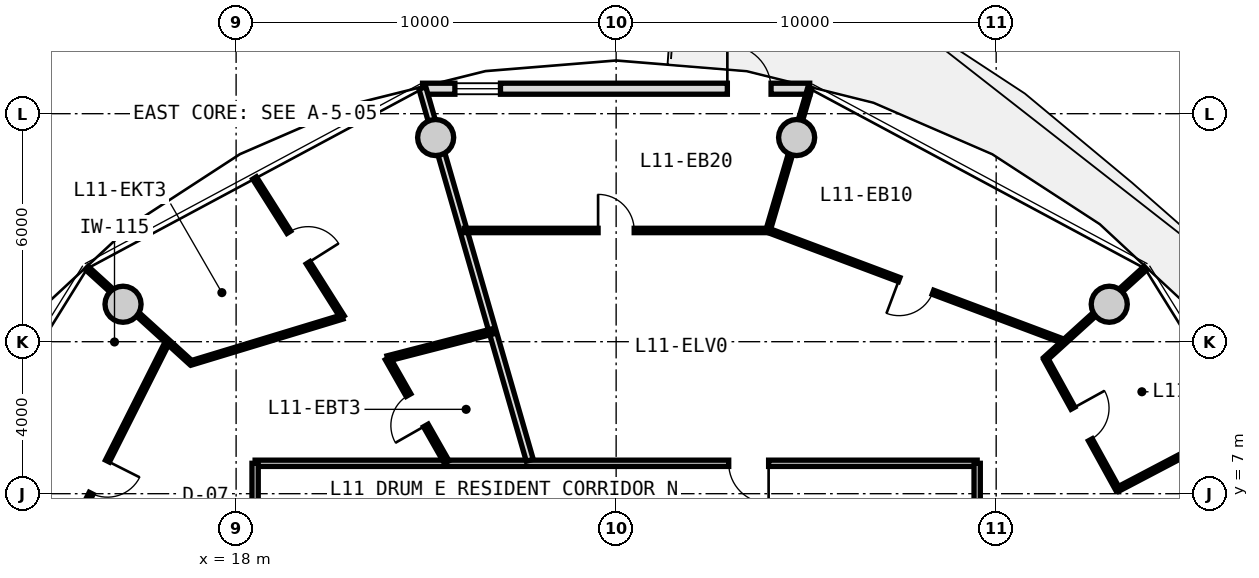
"""IFC4 building model, lengths in metres.
Left out: names, types, materials, properties, quantities, classifications, styles, units other than length and angle.
Written with IfcOpenShell. Run it as: python <this file> out.ifc"""

import sys

from ifc_helpers import new_model, si_unit, direction, frame, frame_2d, origin, origin_2d, place, context, subcontext, project, spatial, rectangle, circle, extrude, source, transform, mapped, element, fill, save


model = new_model("IFC4")
c1 = context("Model", 3, precision=1e-05, world=origin(), true_north=direction((0.0, 1.0)))
c2 = subcontext(c1, "Body", "Model", "MODEL_VIEW")
j1 = project(units=[si_unit("LENGTHUNIT", "METRE"), si_unit("PLANEANGLEUNIT", "RADIAN")], contexts=[c1])
p1 = place(None, origin())
s1 = spatial("IfcSite", under=j1, at=p1, CompositionType="ELEMENT")
p2 = place(p1, origin())
s2 = spatial("IfcBuilding", under=s1, at=p2, CompositionType="ELEMENT")
p3 = place(p2, frame((0.0, 0.0, 39.9)))
s3 = spatial("IfcBuildingStorey", under=s2, at=p3, CompositionType="ELEMENT", Elevation=39.9)
m1 = source(origin(), c2, "Body", "SweptSolid", [
    extrude(circle(Radius=0.475, at=origin_2d()), origin(), (0.0, 0.0, 1.0), 3.05),
])
for number, where, z_axis, x_axis in (
    (1, (40.975, 11.985, 0.0), (0.0, 0.0, 1.0), (1.0, 0.0, 0.0)),
    (2, (32.749, 16.373, 0.0), (0.0, 0.0, 1.0), (1.0, 0.0, 0.0)),
    (3, (23.251, 16.373, 0.0), (0.0, 0.0, 1.0), (1.0, 0.0, 0.0)),
    (4, (15.025, 11.985, 0.0), (0.0, 0.0, 1.0), (1.0, 0.0, 0.0)),
):
    element("IfcColumn", number, at=place(p3, frame(where, z_axis=z_axis, x_axis=x_axis)), inside=s3, PredefinedType="COLUMN", context=c2, shape_type="MappedRepresentation", body=[
        mapped(m1, transform((0.0, 0.0, 0.0), x_axis=(1.0, 0.0, 0.0), y_axis=(0.0, 1.0, 0.0), z_axis=(0.0, 0.0, 1.0), scale=1.0)),
    ])
m2 = source(origin(), c2, "Body", "SweptSolid", [
    extrude(rectangle(XDim=10.187, YDim=0.29, at=frame_2d((5.094, 0.0))), origin(), (0.0, 0.0, 1.0), 2.79),
])
p4 = place(p3, frame((22.906, 17.657, 0.0), z_axis=(0.0, 0.0, 1.0), x_axis=(1.0, 0.0, 0.0)))
e5 = element("IfcWall", 5, at=p4, inside=s3, PredefinedType="SOLIDWALL", context=c2, shape_type="MappedRepresentation", body=[
    mapped(m2, transform((0.0, 0.0, 0.0), x_axis=(1.0, 0.0, 0.0), y_axis=(0.0, 1.0, 0.0), z_axis=(0.0, 0.0, 1.0), scale=1.0)),
])
p5 = place(p4, frame((8.02, 0.0, 0.0)))
e6 = element("IfcOpeningElement", 6, at=p5, cuts=e5, PredefinedType="OPENING", context=c2, shape_type="SweptSolid", body=[
    extrude(rectangle(XDim=1.15, YDim=2.25, at=frame_2d((0.575, 1.125))), frame((0.0, 0.155, 0.0), z_axis=(0.0, -1.0, 0.0), x_axis=(1.0, 0.0, 0.0)), (0.0, 0.0, 1.0), 0.31),
])
p6 = place(p4, frame((0.85, 0.0, 0.85)))
e7 = element("IfcOpeningElement", 7, at=p6, cuts=e5, PredefinedType="OPENING", context=c2, shape_type="SweptSolid", body=[
    extrude(rectangle(XDim=1.2, YDim=1.5, at=frame_2d((0.6, 0.75))), frame((0.0, 0.155, 0.0), z_axis=(0.0, -1.0, 0.0), x_axis=(1.0, 0.0, 0.0)), (0.0, 0.0, 1.0), 0.31),
])
m3 = source(origin(), c2, "Body", "SweptSolid", [
    extrude(rectangle(XDim=19.0, YDim=0.165, at=frame_2d((9.5, 0.0))), origin(), (0.0, 0.0, 1.0), 2.775),
])
p7 = place(p3, frame((18.5, 7.8, 0.0), z_axis=(0.0, 0.0, 1.0), x_axis=(1.0, 0.0, 0.0)))
e8 = element("IfcWall", 8, at=p7, inside=s3, PredefinedType="PARTITIONING", context=c2, shape_type="MappedRepresentation", body=[
    mapped(m3, transform((0.0, 0.0, 0.0), x_axis=(1.0, 0.0, 0.0), y_axis=(0.0, 1.0, 0.0), z_axis=(0.0, 0.0, 1.0), scale=1.0)),
])
p8 = place(p7, frame((12.462, 0.0, 0.0)))
e9 = element("IfcOpeningElement", 9, at=p8, cuts=e8, PredefinedType="OPENING", context=c2, shape_type="SweptSolid", body=[
    extrude(rectangle(XDim=1.05, YDim=2.15, at=frame_2d((0.525, 1.075))), frame((0.0, 0.093, 0.0), z_axis=(0.0, -1.0, 0.0), x_axis=(1.0, 0.0, 0.0)), (0.0, 0.0, 1.0), 0.185),
])
m4 = source(origin(), c2, "Body", "SweptSolid", [
    extrude(rectangle(XDim=15.6, YDim=0.165, at=frame_2d((7.8, 0.0))), origin(), (0.0, 0.0, 1.0), 2.775),
])
p9 = place(p3, frame((18.5, -7.8, 0.0), z_axis=(0.0, 0.0, 1.0), x_axis=(0.0, 1.0, 0.0)))
e10 = element("IfcWall", 10, at=p9, inside=s3, PredefinedType="PARTITIONING", context=c2, shape_type="MappedRepresentation", body=[
    mapped(m4, transform((0.0, 0.0, 0.0), x_axis=(1.0, 0.0, 0.0), y_axis=(0.0, 1.0, 0.0), z_axis=(0.0, 0.0, 1.0), scale=1.0)),
])
p10 = place(p9, frame((7.275, 0.0, 0.0)))
e11 = element("IfcOpeningElement", 11, at=p10, cuts=e10, PredefinedType="OPENING", context=c2, shape_type="SweptSolid", body=[
    extrude(rectangle(XDim=1.05, YDim=2.15, at=frame_2d((0.525, 1.075))), frame((0.0, 0.093, 0.0), z_axis=(0.0, -1.0, 0.0), x_axis=(1.0, 0.0, 0.0)), (0.0, 0.0, 1.0), 0.185),
])
p11 = place(p3, frame((37.5, 7.8, 0.0), z_axis=(0.0, 0.0, 1.0), x_axis=(0.0, -1.0, 0.0)))
e12 = element("IfcWall", 12, at=p11, inside=s3, PredefinedType="PARTITIONING", context=c2, shape_type="MappedRepresentation", body=[
    mapped(m4, transform((0.0, 0.0, 0.0), x_axis=(1.0, 0.0, 0.0), y_axis=(0.0, 1.0, 0.0), z_axis=(0.0, 0.0, 1.0), scale=1.0)),
])
p12 = place(p11, frame((14.215, 0.0, 0.0)))
e13 = element("IfcOpeningElement", 13, at=p12, cuts=e12, PredefinedType="OPENING", context=c2, shape_type="SweptSolid", body=[
    extrude(rectangle(XDim=0.92, YDim=2.1, at=frame_2d((0.46, 1.05))), frame((0.0, 0.093, 0.0), z_axis=(0.0, -1.0, 0.0), x_axis=(1.0, 0.0, 0.0)), (0.0, 0.0, 1.0), 0.185),
])
p13 = place(p11, frame((11.609, 0.0, 0.0)))
e14 = element("IfcOpeningElement", 14, at=p13, cuts=e12, PredefinedType="OPENING", context=c2, shape_type="SweptSolid", body=[
    extrude(rectangle(XDim=0.92, YDim=2.1, at=frame_2d((0.46, 1.05))), frame((0.0, 0.093, 0.0), z_axis=(0.0, -1.0, 0.0), x_axis=(1.0, 0.0, 0.0)), (0.0, 0.0, 1.0), 0.185),
])
p14 = place(p11, frame((7.175, 0.0, 0.0)))
e15 = element("IfcOpeningElement", 15, at=p14, cuts=e12, PredefinedType="OPENING", context=c2, shape_type="SweptSolid", body=[
    extrude(rectangle(XDim=1.25, YDim=2.2, at=frame_2d((0.625, 1.1))), frame((0.0, 0.093, 0.0), z_axis=(0.0, -1.0, 0.0), x_axis=(1.0, 0.0, 0.0)), (0.0, 0.0, 1.0), 0.185),
])
m5 = source(origin(), c2, "Body", "SweptSolid", [
    extrude(rectangle(XDim=10.196, YDim=0.19, at=frame_2d((5.098, 0.0))), origin(), (0.0, 0.0, 1.0), 2.225),
])
p15 = place(p3, frame((25.727, 7.88, 0.0), z_axis=(0.0, 0.0, 1.0), x_axis=(-0.277136420347, 0.960830580549, 0.0)))
e16 = element("IfcWall", 16, at=p15, inside=s3, PredefinedType="PARTITIONING", context=c2, shape_type="MappedRepresentation", body=[
    mapped(m5, transform((0.0, 0.0, 0.0), x_axis=(1.0, 0.0, 0.0), y_axis=(0.0, 1.0, 0.0), z_axis=(0.0, 0.0, 1.0), scale=1.0)),
])
m6 = source(origin(), c2, "Body", "SweptSolid", [
    extrude(rectangle(XDim=8.018, YDim=0.115, at=frame_2d((4.009, 0.0))), origin(), (0.0, 0.0, 1.0), 2.775),
])
p16 = place(p3, frame((16.205, 11.014, 0.0), z_axis=(0.0, 0.0, 1.0), x_axis=(-0.450134355233, -0.89296084026, 0.0)))
e17 = element("IfcWall", 17, at=p16, inside=s3, PredefinedType="PARTITIONING", context=c2, shape_type="MappedRepresentation", body=[
    mapped(m6, transform((0.0, 0.0, 0.0), x_axis=(1.0, 0.0, 0.0), y_axis=(0.0, 1.0, 0.0), z_axis=(0.0, 0.0, 1.0), scale=1.0)),
])
p17 = place(p16, frame((3.534, 0.0, 0.0)))
e18 = element("IfcOpeningElement", 18, at=p17, cuts=e17, PredefinedType="OPENING", context=c2, shape_type="SweptSolid", body=[
    extrude(rectangle(XDim=0.95, YDim=2.1, at=frame_2d((0.475, 1.05))), frame((0.0, 0.067, 0.0), z_axis=(0.0, -1.0, 0.0), x_axis=(1.0, 0.0, 0.0)), (0.0, 0.0, 1.0), 0.135),
])
m7 = source(origin(), c2, "Body", "SweptSolid", [
    extrude(rectangle(XDim=3.7, YDim=0.115, at=frame_2d((1.85, 0.0))), origin(), (0.0, 0.0, 1.0), 2.225),
])
p18 = place(p3, frame((16.808, 10.451, 0.0), z_axis=(0.0, 0.0, 1.0), x_axis=(-0.739922161065, 0.672692497033, 0.0)))
e19 = element("IfcWall", 19, at=p18, inside=s3, PredefinedType="PARTITIONING", context=c2, shape_type="MappedRepresentation", body=[
    mapped(m7, transform((0.0, 0.0, 0.0), x_axis=(1.0, 0.0, 0.0), y_axis=(0.0, 1.0, 0.0), z_axis=(0.0, 0.0, 1.0), scale=1.0)),
])
m8 = source(origin(), c2, "Body", "SweptSolid", [
    extrude(rectangle(XDim=3.141, YDim=0.14, at=frame_2d((1.571, 0.0))), origin(), (0.0, 0.0, 1.0), 2.775),
])
p19 = place(p3, frame((23.542, 7.83, 0.0), z_axis=(0.0, 0.0, 1.0), x_axis=(-0.494874486088, 0.868964465913, 0.0)))
e20 = element("IfcWall", 20, at=p19, inside=s3, PredefinedType="PARTITIONING", context=c2, shape_type="MappedRepresentation", body=[
    mapped(m8, transform((0.0, 0.0, 0.0), x_axis=(1.0, 0.0, 0.0), y_axis=(0.0, 1.0, 0.0), z_axis=(0.0, 0.0, 1.0), scale=1.0)),
])
p20 = place(p19, frame((1.111, 0.0, 0.0)))
e21 = element("IfcOpeningElement", 21, at=p20, cuts=e20, PredefinedType="OPENING", context=c2, shape_type="SweptSolid", body=[
    extrude(rectangle(XDim=0.92, YDim=2.1, at=frame_2d((0.46, 1.05))), frame((0.0, 0.08, 0.0), z_axis=(0.0, -1.0, 0.0), x_axis=(1.0, 0.0, 0.0)), (0.0, 0.0, 1.0), 0.16),
])
m9 = source(origin(), c2, "Body", "SweptSolid", [
    extrude(rectangle(XDim=2.868, YDim=0.14, at=frame_2d((1.434, 0.0))), origin(), (0.0, 0.0, 1.0), 2.775),
])
p21 = place(p3, frame((21.987, 10.56, 0.0), z_axis=(0.0, 0.0, 1.0), x_axis=(0.968467705195, 0.249139125778, 0.0)))
e22 = element("IfcWall", 22, at=p21, inside=s3, PredefinedType="PARTITIONING", context=c2, shape_type="MappedRepresentation", body=[
    mapped(m9, transform((0.0, 0.0, 0.0), x_axis=(1.0, 0.0, 0.0), y_axis=(0.0, 1.0, 0.0), z_axis=(0.0, 0.0, 1.0), scale=1.0)),
])
m10 = source(origin(), c2, "Body", "SweptSolid", [
    extrude(rectangle(XDim=4.326, YDim=0.115, at=frame_2d((2.163, 0.0))), origin(), (0.0, 0.0, 1.0), 2.775),
])
p22 = place(p3, frame((20.796, 11.651, 0.0), z_axis=(0.0, 0.0, 1.0), x_axis=(-0.534101263803, 0.845420510755, 0.0)))
e23 = element("IfcWall", 23, at=p22, inside=s3, PredefinedType="PARTITIONING", context=c2, shape_type="MappedRepresentation", body=[
    mapped(m10, transform((0.0, 0.0, 0.0), x_axis=(1.0, 0.0, 0.0), y_axis=(0.0, 1.0, 0.0), z_axis=(0.0, 0.0, 1.0), scale=1.0)),
])
p23 = place(p22, frame((1.688, 0.0, 0.0)))
e24 = element("IfcOpeningElement", 24, at=p23, cuts=e23, PredefinedType="OPENING", context=c2, shape_type="SweptSolid", body=[
    extrude(rectangle(XDim=0.95, YDim=2.1, at=frame_2d((0.475, 1.05))), frame((0.0, 0.067, 0.0), z_axis=(0.0, -1.0, 0.0), x_axis=(1.0, 0.0, 0.0)), (0.0, 0.0, 1.0), 0.135),
])
m11 = source(origin(), c2, "Body", "SweptSolid", [
    extrude(rectangle(XDim=4.159, YDim=0.115, at=frame_2d((2.079, 0.0))), origin(), (0.0, 0.0, 1.0), 2.415),
])
p24 = place(p3, frame((20.796, 11.651, 0.0), z_axis=(0.0, 0.0, 1.0), x_axis=(-0.956846477815, -0.290593905466, 0.0)))
e25 = element("IfcWall", 25, at=p24, inside=s3, PredefinedType="PARTITIONING", context=c2, shape_type="MappedRepresentation", body=[
    mapped(m11, transform((0.0, 0.0, 0.0), x_axis=(1.0, 0.0, 0.0), y_axis=(0.0, 1.0, 0.0), z_axis=(0.0, 0.0, 1.0), scale=1.0)),
])
m12 = source(origin(), c2, "Body", "SweptSolid", [
    extrude(rectangle(XDim=8.32, YDim=0.115, at=frame_2d((4.16, 0.0))), origin(), (0.0, 0.0, 1.0), 2.775),
])
p25 = place(p3, frame((39.786, 11.006, 0.0), z_axis=(0.0, 0.0, 1.0), x_axis=(-0.936180763098, 0.351518959382, 0.0)))
e26 = element("IfcWall", 26, at=p25, inside=s3, PredefinedType="PARTITIONING", context=c2, shape_type="MappedRepresentation", body=[
    mapped(m12, transform((0.0, 0.0, 0.0), x_axis=(1.0, 0.0, 0.0), y_axis=(0.0, 1.0, 0.0), z_axis=(0.0, 0.0, 1.0), scale=1.0)),
])
p26 = place(p25, frame((3.685, 0.0, 0.0)))
e27 = element("IfcOpeningElement", 27, at=p26, cuts=e26, PredefinedType="OPENING", context=c2, shape_type="SweptSolid", body=[
    extrude(rectangle(XDim=0.95, YDim=2.1, at=frame_2d((0.475, 1.05))), frame((0.0, 0.067, 0.0), z_axis=(0.0, -1.0, 0.0), x_axis=(1.0, 0.0, 0.0)), (0.0, 0.0, 1.0), 0.135),
])
m13 = source(origin(), c2, "Body", "SweptSolid", [
    extrude(rectangle(XDim=3.563, YDim=0.115, at=frame_2d((1.781, 0.0))), origin(), (0.0, 0.0, 1.0), 2.225),
])
p27 = place(p3, frame((39.292, 10.545, 0.0), z_axis=(0.0, 0.0, 1.0), x_axis=(0.740277955068, 0.672300936515, 0.0)))
e28 = element("IfcWall", 28, at=p27, inside=s3, PredefinedType="PARTITIONING", context=c2, shape_type="MappedRepresentation", body=[
    mapped(m13, transform((0.0, 0.0, 0.0), x_axis=(1.0, 0.0, 0.0), y_axis=(0.0, 1.0, 0.0), z_axis=(0.0, 0.0, 1.0), scale=1.0)),
])
m14 = source(origin(), c2, "Body", "SweptSolid", [
    extrude(rectangle(XDim=7.993, YDim=0.115, at=frame_2d((3.996, 0.0))), origin(), (0.0, 0.0, 1.0), 2.775),
])
p28 = place(p3, frame((31.996, 13.927, 0.0), z_axis=(0.0, 0.0, 1.0), x_axis=(-1.0, 0.0, 0.0)))
e29 = element("IfcWall", 29, at=p28, inside=s3, PredefinedType="PARTITIONING", context=c2, shape_type="MappedRepresentation", body=[
    mapped(m14, transform((0.0, 0.0, 0.0), x_axis=(1.0, 0.0, 0.0), y_axis=(0.0, 1.0, 0.0), z_axis=(0.0, 0.0, 1.0), scale=1.0)),
])
p29 = place(p28, frame((3.521, 0.0, 0.0)))
e30 = element("IfcOpeningElement", 30, at=p29, cuts=e29, PredefinedType="OPENING", context=c2, shape_type="SweptSolid", body=[
    extrude(rectangle(XDim=0.95, YDim=2.1, at=frame_2d((0.475, 1.05))), frame((0.0, 0.067, 0.0), z_axis=(0.0, -1.0, 0.0), x_axis=(1.0, 0.0, 0.0)), (0.0, 0.0, 1.0), 0.135),
])
m15 = source(origin(), c2, "Body", "SweptSolid", [
    extrude(rectangle(XDim=3.908, YDim=0.115, at=frame_2d((1.954, 0.0))), origin(), (0.0, 0.0, 1.0), 2.225),
])
p30 = place(p3, frame((31.996, 13.927, 0.0), z_axis=(0.0, 0.0, 1.0), x_axis=(0.282047948883, 0.959400309845, 0.0)))
e31 = element("IfcWall", 31, at=p30, inside=s3, PredefinedType="PARTITIONING", context=c2, shape_type="MappedRepresentation", body=[
    mapped(m15, transform((0.0, 0.0, 0.0), x_axis=(1.0, 0.0, 0.0), y_axis=(0.0, 1.0, 0.0), z_axis=(0.0, 0.0, 1.0), scale=1.0)),
])
m16 = source(origin(), c2, "Body", "SweptSolid", [
    extrude(rectangle(XDim=3.706, YDim=0.115, at=frame_2d((1.853, 0.0))), origin(), (0.0, 0.0, 1.0), 2.775),
])
p31 = place(p3, frame((41.198, 7.115, 0.0), z_axis=(0.0, 0.0, 1.0), x_axis=(0.88538502503, 0.464858427322, 0.0)))
e32 = element("IfcWall", 32, at=p31, inside=s3, PredefinedType="PARTITIONING", context=c2, shape_type="MappedRepresentation", body=[
    mapped(m16, transform((0.0, 0.0, 0.0), x_axis=(1.0, 0.0, 0.0), y_axis=(0.0, 1.0, 0.0), z_axis=(0.0, 0.0, 1.0), scale=1.0)),
])
m17 = source(origin(), c2, "Body", "SweptSolid", [
    extrude(rectangle(XDim=3.926, YDim=0.115, at=frame_2d((1.963, 0.0))), origin(), (0.0, 0.0, 1.0), 2.775),
])
p32 = place(p3, frame((41.198, 7.115, 0.0), z_axis=(0.0, 0.0, 1.0), x_axis=(-0.483037889915, 0.875599450038, 0.0)))
e33 = element("IfcWall", 33, at=p32, inside=s3, PredefinedType="PARTITIONING", context=c2, shape_type="MappedRepresentation", body=[
    mapped(m17, transform((0.0, 0.0, 0.0), x_axis=(1.0, 0.0, 0.0), y_axis=(0.0, 1.0, 0.0), z_axis=(0.0, 0.0, 1.0), scale=1.0)),
])
p33 = place(p32, frame((1.488, 0.0, 0.0)))
e34 = element("IfcOpeningElement", 34, at=p33, cuts=e33, PredefinedType="OPENING", context=c2, shape_type="SweptSolid", body=[
    extrude(rectangle(XDim=0.95, YDim=2.1, at=frame_2d((0.475, 1.05))), frame((0.0, 0.067, 0.0), z_axis=(0.0, -1.0, 0.0), x_axis=(1.0, 0.0, 0.0)), (0.0, 0.0, 1.0), 0.135),
])
m18 = source(origin(), c2, "Body", "SweptSolid", [
    extrude(rectangle(XDim=1.15, YDim=2.25, at=frame_2d((0.575, 1.125))), frame((0.0, 0.025, 0.0), z_axis=(0.0, -1.0, 0.0), x_axis=(1.0, 0.0, 0.0)), (0.0, 0.0, 1.0), 0.05),
])
p34 = place(p5, origin())
e35 = element("IfcDoor", 35, at=p34, inside=s3, OperationType="SINGLE_SWING_LEFT", PredefinedType="DOOR", context=c2, shape_type="MappedRepresentation", body=[
    mapped(m18, transform((0.0, 0.0, 0.0), x_axis=(1.0, 0.0, 0.0), y_axis=(0.0, 1.0, 0.0), z_axis=(0.0, 0.0, 1.0), scale=1.0)),
])
fill(e6, e35)
m19 = source(origin(), c2, "Body", "SweptSolid", [
    extrude(rectangle(XDim=1.2, YDim=1.5, at=frame_2d((0.6, 0.75))), frame((0.0, 0.03, 0.0), z_axis=(0.0, -1.0, 0.0), x_axis=(1.0, 0.0, 0.0)), (0.0, 0.0, 1.0), 0.06),
])
p35 = place(p6, origin())
e36 = element("IfcWindow", 36, at=p35, inside=s3, PartitioningType="SINGLE_PANEL", PredefinedType="WINDOW", context=c2, shape_type="MappedRepresentation", body=[
    mapped(m19, transform((0.0, 0.0, 0.0), x_axis=(1.0, 0.0, 0.0), y_axis=(0.0, 1.0, 0.0), z_axis=(0.0, 0.0, 1.0), scale=1.0)),
])
fill(e7, e36)
m20 = source(origin(), c2, "Body", "SweptSolid", [
    extrude(rectangle(XDim=0.92, YDim=2.1, at=frame_2d((0.46, 1.05))), frame((0.0, 0.025, 0.0), z_axis=(0.0, -1.0, 0.0), x_axis=(1.0, 0.0, 0.0)), (0.0, 0.0, 1.0), 0.05),
])
p36 = place(p20, origin())
e37 = element("IfcDoor", 37, at=p36, inside=s3, OperationType="SINGLE_SWING_LEFT", PredefinedType="DOOR", context=c2, shape_type="MappedRepresentation", body=[
    mapped(m20, transform((0.0, 0.0, 0.0), x_axis=(1.0, 0.0, 0.0), y_axis=(0.0, 1.0, 0.0), z_axis=(0.0, 0.0, 1.0), scale=1.0)),
])
fill(e21, e37)
m21 = source(origin(), c2, "Body", "SweptSolid", [
    extrude(rectangle(XDim=0.95, YDim=2.1, at=frame_2d((0.475, 1.05))), frame((0.0, 0.025, 0.0), z_axis=(0.0, -1.0, 0.0), x_axis=(1.0, 0.0, 0.0)), (0.0, 0.0, 1.0), 0.05),
])
p37 = place(p23, frame((0.95, 0.0, 0.0), z_axis=(0.0, 0.0, 1.0), x_axis=(-1.0, 0.0, 0.0)))
e38 = element("IfcDoor", 38, at=p37, inside=s3, OperationType="SINGLE_SWING_RIGHT", PredefinedType="DOOR", context=c2, shape_type="MappedRepresentation", body=[
    mapped(m21, transform((0.0, 0.0, 0.0), x_axis=(1.0, 0.0, 0.0), y_axis=(0.0, 1.0, 0.0), z_axis=(0.0, 0.0, 1.0), scale=1.0)),
])
fill(e24, e38)
p38 = place(p17, origin())
e39 = element("IfcDoor", 39, at=p38, inside=s3, OperationType="SINGLE_SWING_LEFT", PredefinedType="DOOR", context=c2, shape_type="MappedRepresentation", body=[
    mapped(m21, transform((0.0, 0.0, 0.0), x_axis=(1.0, 0.0, 0.0), y_axis=(0.0, 1.0, 0.0), z_axis=(0.0, 0.0, 1.0), scale=1.0)),
])
fill(e18, e39)
m22 = source(origin(), c2, "Body", "SweptSolid", [
    extrude(rectangle(XDim=1.05, YDim=2.15, at=frame_2d((0.525, 1.075))), frame((0.0, 0.025, 0.0), z_axis=(0.0, -1.0, 0.0), x_axis=(1.0, 0.0, 0.0)), (0.0, 0.0, 1.0), 0.05),
])
p39 = place(p8, frame((1.05, 0.0, 0.0), z_axis=(0.0, 0.0, 1.0), x_axis=(-1.0, 0.0, 0.0)))
e40 = element("IfcDoor", 40, at=p39, inside=s3, OperationType="SINGLE_SWING_LEFT", PredefinedType="DOOR", context=c2, shape_type="MappedRepresentation", body=[
    mapped(m22, transform((0.0, 0.0, 0.0), x_axis=(1.0, 0.0, 0.0), y_axis=(0.0, 1.0, 0.0), z_axis=(0.0, 0.0, 1.0), scale=1.0)),
])
fill(e9, e40)
p40 = place(p33, frame((0.95, 0.0, 0.0), z_axis=(0.0, 0.0, 1.0), x_axis=(-1.0, 0.0, 0.0)))
e41 = element("IfcDoor", 41, at=p40, inside=s3, OperationType="SINGLE_SWING_LEFT", PredefinedType="DOOR", context=c2, shape_type="MappedRepresentation", body=[
    mapped(m21, transform((0.0, 0.0, 0.0), x_axis=(1.0, 0.0, 0.0), y_axis=(0.0, 1.0, 0.0), z_axis=(0.0, 0.0, 1.0), scale=1.0)),
])
fill(e34, e41)
p41 = place(p26, origin())
e42 = element("IfcDoor", 42, at=p41, inside=s3, OperationType="SINGLE_SWING_RIGHT", PredefinedType="DOOR", context=c2, shape_type="MappedRepresentation", body=[
    mapped(m21, transform((0.0, 0.0, 0.0), x_axis=(1.0, 0.0, 0.0), y_axis=(0.0, 1.0, 0.0), z_axis=(0.0, 0.0, 1.0), scale=1.0)),
])
fill(e27, e42)
p42 = place(p29, frame((0.95, 0.0, 0.0), z_axis=(0.0, 0.0, 1.0), x_axis=(-1.0, 0.0, 0.0)))
e43 = element("IfcDoor", 43, at=p42, inside=s3, OperationType="SINGLE_SWING_LEFT", PredefinedType="DOOR", context=c2, shape_type="MappedRepresentation", body=[
    mapped(m21, transform((0.0, 0.0, 0.0), x_axis=(1.0, 0.0, 0.0), y_axis=(0.0, 1.0, 0.0), z_axis=(0.0, 0.0, 1.0), scale=1.0)),
])
fill(e30, e43)
save(model, sys.argv[1])
